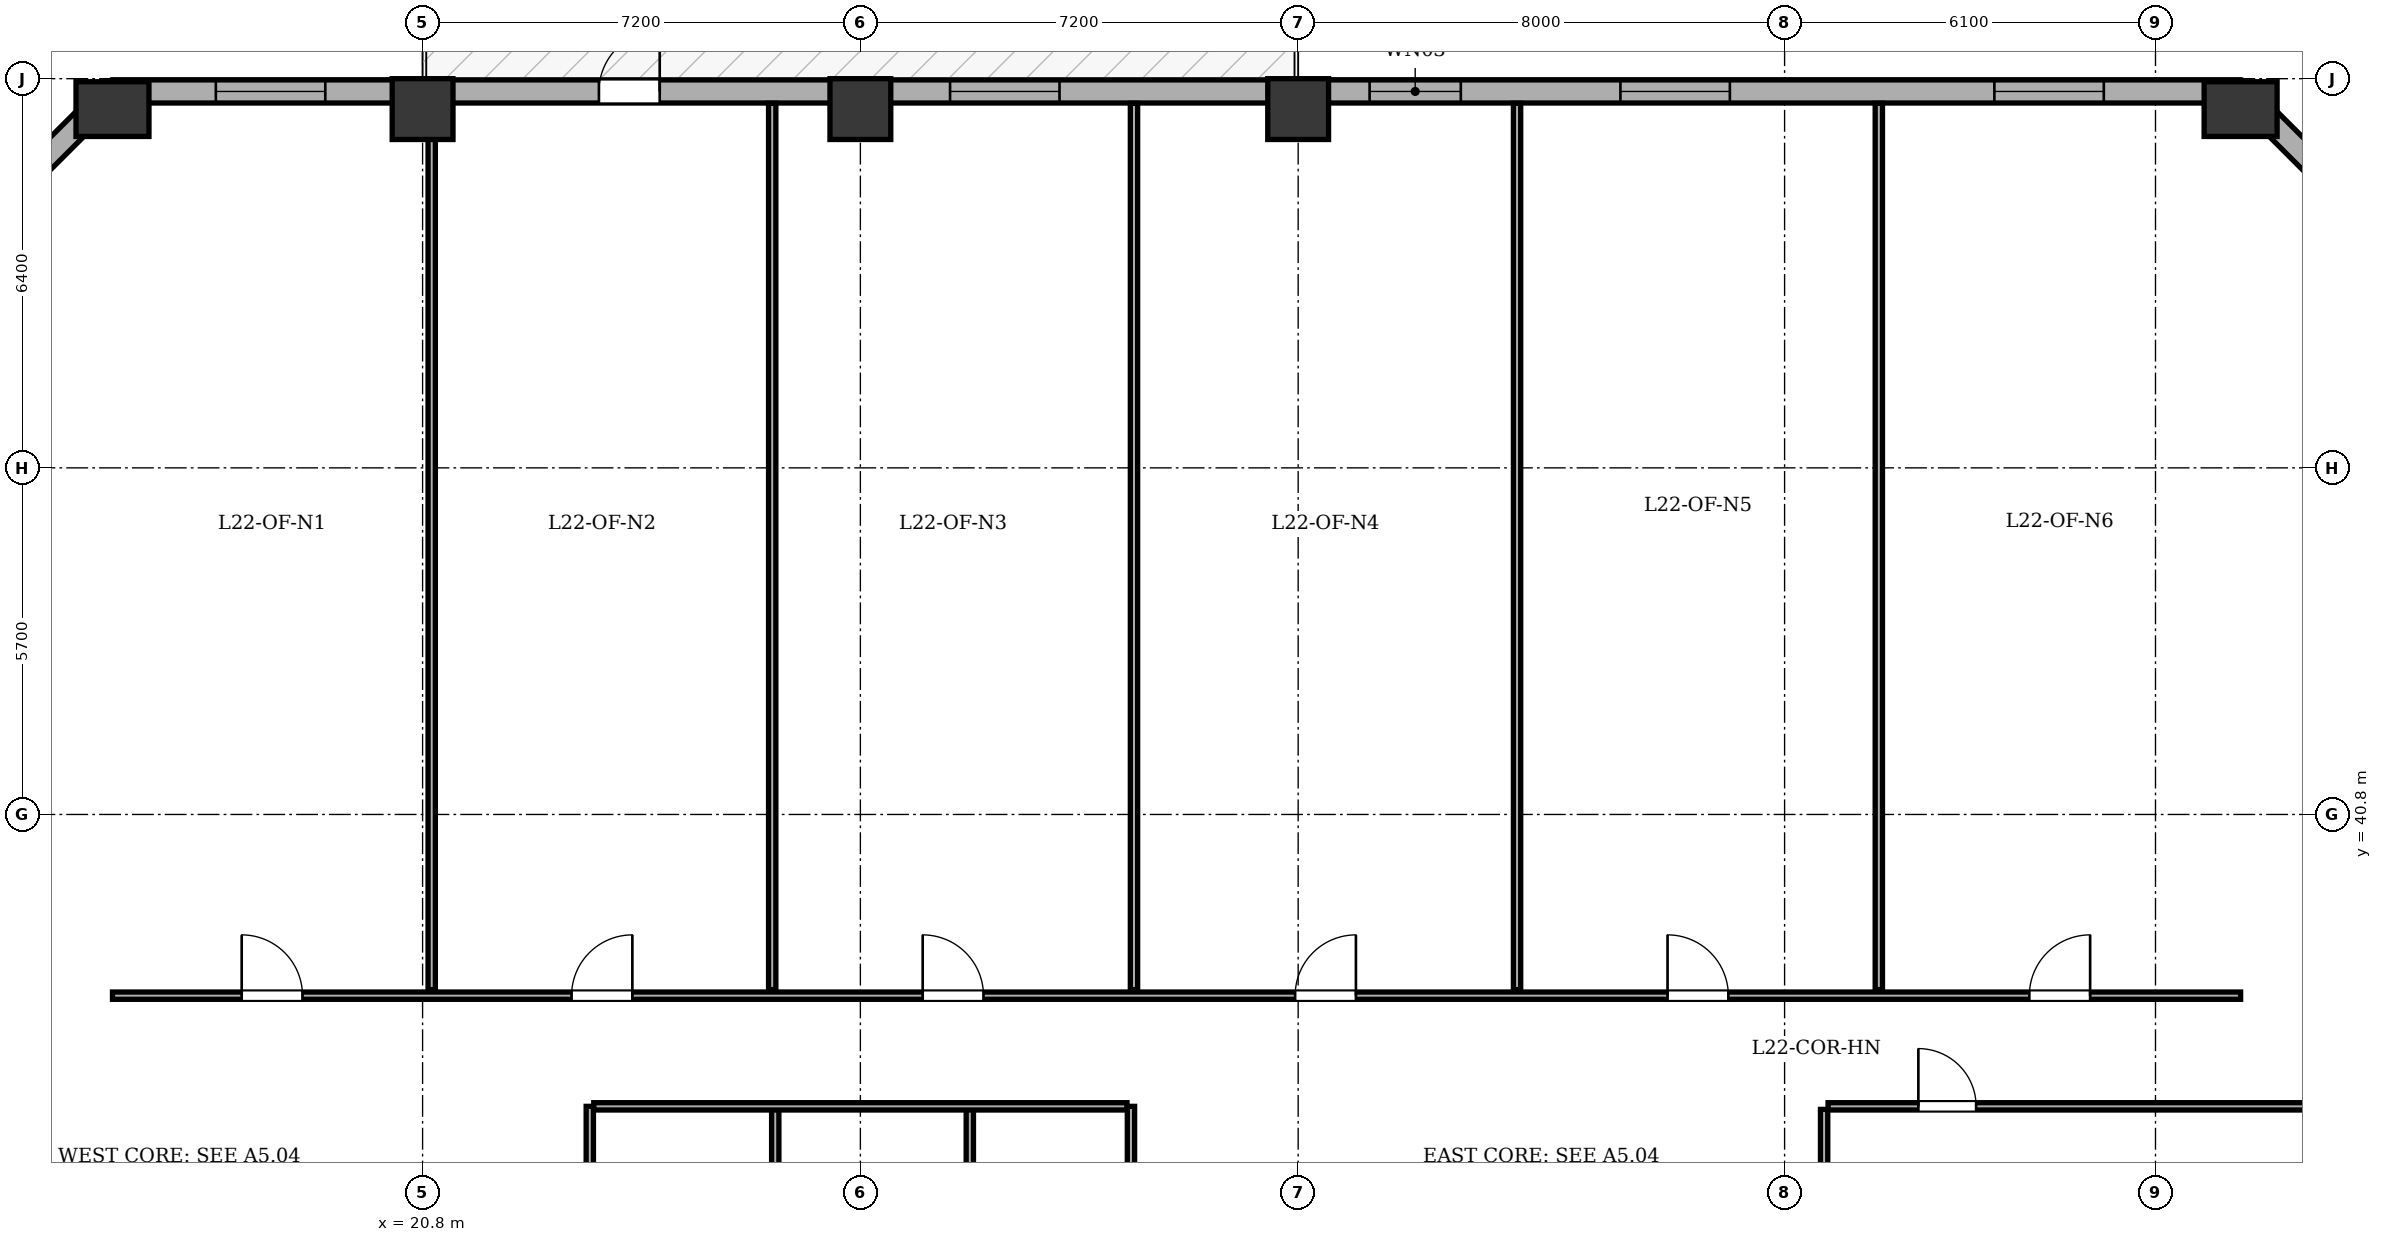
"""IFC4 building model, lengths in metres.
Left out: names, types, materials, properties, quantities, classifications, styles, units other than length and angle.
Written with IfcOpenShell. Run it as: python <this file> out.ifc"""

import sys

from ifc_helpers import new_model, si_unit, direction, frame, frame_2d, origin, origin_2d, place, context, subcontext, project, spatial, rectangle, extrude, element, fill, save


model = new_model("IFC4")
c1 = context("Model", 3, precision=1e-05, world=origin(), true_north=direction((0.0, 1.0)))
c2 = subcontext(c1, "Body", "Model", "MODEL_VIEW")
j1 = project(units=[si_unit("LENGTHUNIT", "METRE"), si_unit("PLANEANGLEUNIT", "RADIAN")], contexts=[c1])
p1 = place(None, origin())
s1 = spatial("IfcSite", under=j1, at=p1, CompositionType="ELEMENT")
p2 = place(p1, origin())
s2 = spatial("IfcBuilding", under=s1, at=p2, CompositionType="ELEMENT")
p3 = place(p2, frame((0.0, 0.0, 90.6)))
s3 = spatial("IfcBuildingStorey", under=s2, at=p3, CompositionType="ELEMENT", Elevation=90.6)
p4 = place(p3, frame((15.7, 52.4, 0.0), z_axis=(0.0, 0.0, 1.0), x_axis=(1.0, 0.0, 0.0)))
e1 = element("IfcColumn", 1, at=p4, inside=s3, PredefinedType="COLUMN", context=c2, shape_type="SweptSolid", body=[
    extrude(rectangle(XDim=0.9, YDim=1.2, at=origin_2d()), origin(), (0.0, 0.0, 1.0), 3.9),
])
for number, where, z_axis, x_axis in (
    (2, (20.8, 52.4, 0.0), (0.0, 0.0, 1.0), (1.0, 0.0, 0.0)),
    (3, (28.0, 52.4, 0.0), (0.0, 0.0, 1.0), (1.0, 0.0, 0.0)),
    (4, (35.2, 52.4, 0.0), (0.0, 0.0, 1.0), (1.0, 0.0, 0.0)),
):
    element("IfcColumn", number, at=place(p3, frame(where, z_axis=z_axis, x_axis=x_axis)), inside=s3, PredefinedType="COLUMN", context=c2, shape_type="SweptSolid", body=[
        extrude(rectangle(XDim=1.0, YDim=1.0, at=origin_2d()), origin(), (0.0, 0.0, 1.0), 3.9),
    ])
p5 = place(p3, frame((50.7, 52.4, 0.0), z_axis=(0.0, 0.0, 1.0), x_axis=(1.0, 0.0, 0.0)))
e5 = element("IfcColumn", 5, at=p5, inside=s3, PredefinedType="COLUMN", context=c2, shape_type="SweptSolid", body=[
    extrude(rectangle(XDim=0.9, YDim=1.2, at=origin_2d()), origin(), (0.0, 0.0, 1.0), 3.9),
])
p6 = place(p3, frame((10.91, 47.9, 0.0), z_axis=(0.0, 0.0, 1.0), x_axis=(0.707106781187, 0.707106781187, 0.0)))
e6 = element("IfcWall", 6, at=p6, inside=s3, PredefinedType="STANDARD", context=c2, shape_type="SweptSolid", body=[
    extrude(rectangle(XDim=6.774, YDim=0.38, at=frame_2d((3.387, 0.0))), origin(), (0.0, 0.0, 1.0), 2.835),
])
p7 = place(p6, frame((2.687, 0.0, 0.8)))
e7 = element("IfcOpeningElement", 7, at=p7, cuts=e6, PredefinedType="OPENING", context=c2, shape_type="SweptSolid", body=[
    extrude(rectangle(XDim=1.4, YDim=1.65, at=frame_2d((0.7, 0.825))), frame((0.0, 0.2, 0.0), z_axis=(0.0, -1.0, 0.0), x_axis=(1.0, 0.0, 0.0)), (0.0, 0.0, 1.0), 0.4),
])
p8 = place(p3, frame((15.7, 52.69, 0.0), z_axis=(0.0, 0.0, 1.0), x_axis=(1.0, 0.0, 0.0)))
e8 = element("IfcWall", 8, at=p8, inside=s3, PredefinedType="STANDARD", context=c2, shape_type="SweptSolid", body=[
    extrude(rectangle(XDim=35.0, YDim=0.38, at=frame_2d((17.5, 0.0))), origin(), (0.0, 0.0, 1.0), 2.835),
])
p9 = place(p8, frame((8.0, 0.0, 0.0)))
e9 = element("IfcOpeningElement", 9, at=p9, cuts=e8, PredefinedType="OPENING", context=c2, shape_type="SweptSolid", body=[
    extrude(rectangle(XDim=1.0, YDim=2.02, at=frame_2d((0.5, 1.01))), frame((0.0, 0.2, 0.0), z_axis=(0.0, -1.0, 0.0), x_axis=(1.0, 0.0, 0.0)), (0.0, 0.0, 1.0), 0.4),
])
p10 = place(p8, frame((1.7, 0.0, 0.8)))
e10 = element("IfcOpeningElement", 10, at=p10, cuts=e8, PredefinedType="OPENING", context=c2, shape_type="SweptSolid", body=[
    extrude(rectangle(XDim=1.8, YDim=1.9, at=frame_2d((0.9, 0.95))), frame((0.0, 0.2, 0.0), z_axis=(0.0, -1.0, 0.0), x_axis=(1.0, 0.0, 0.0)), (0.0, 0.0, 1.0), 0.4),
])
p11 = place(p8, frame((13.775, 0.0, 0.8)))
e11 = element("IfcOpeningElement", 11, at=p11, cuts=e8, PredefinedType="OPENING", context=c2, shape_type="SweptSolid", body=[
    extrude(rectangle(XDim=1.8, YDim=1.9, at=frame_2d((0.9, 0.95))), frame((0.0, 0.2, 0.0), z_axis=(0.0, -1.0, 0.0), x_axis=(1.0, 0.0, 0.0)), (0.0, 0.0, 1.0), 0.4),
])
p12 = place(p8, frame((20.675, 0.0, 0.8)))
e12 = element("IfcOpeningElement", 12, at=p12, cuts=e8, PredefinedType="OPENING", context=c2, shape_type="SweptSolid", body=[
    extrude(rectangle(XDim=1.5, YDim=1.9, at=frame_2d((0.75, 0.95))), frame((0.0, 0.2, 0.0), z_axis=(0.0, -1.0, 0.0), x_axis=(1.0, 0.0, 0.0)), (0.0, 0.0, 1.0), 0.4),
])
p13 = place(p8, frame((24.8, 0.0, 0.8)))
e13 = element("IfcOpeningElement", 13, at=p13, cuts=e8, PredefinedType="OPENING", context=c2, shape_type="SweptSolid", body=[
    extrude(rectangle(XDim=1.8, YDim=1.9, at=frame_2d((0.9, 0.95))), frame((0.0, 0.2, 0.0), z_axis=(0.0, -1.0, 0.0), x_axis=(1.0, 0.0, 0.0)), (0.0, 0.0, 1.0), 0.4),
])
p14 = place(p8, frame((30.95, 0.0, 0.8)))
e14 = element("IfcOpeningElement", 14, at=p14, cuts=e8, PredefinedType="OPENING", context=c2, shape_type="SweptSolid", body=[
    extrude(rectangle(XDim=1.8, YDim=1.9, at=frame_2d((0.9, 0.95))), frame((0.0, 0.2, 0.0), z_axis=(0.0, -1.0, 0.0), x_axis=(1.0, 0.0, 0.0)), (0.0, 0.0, 1.0), 0.4),
])
p15 = place(p3, frame((50.7, 52.69, 0.0), z_axis=(0.0, 0.0, 1.0), x_axis=(0.707106781187, -0.707106781187, 0.0)))
e15 = element("IfcWall", 15, at=p15, inside=s3, PredefinedType="STANDARD", context=c2, shape_type="SweptSolid", body=[
    extrude(rectangle(XDim=6.774, YDim=0.38, at=frame_2d((3.387, 0.0))), origin(), (0.0, 0.0, 1.0), 2.835),
])
p16 = place(p15, frame((2.687, 0.0, 0.8)))
e16 = element("IfcOpeningElement", 16, at=p16, cuts=e15, PredefinedType="OPENING", context=c2, shape_type="SweptSolid", body=[
    extrude(rectangle(XDim=1.4, YDim=1.65, at=frame_2d((0.7, 0.825))), frame((0.0, 0.2, 0.0), z_axis=(0.0, -1.0, 0.0), x_axis=(1.0, 0.0, 0.0)), (0.0, 0.0, 1.0), 0.4),
])
for number, where, z_axis, x_axis in (
    (17, (23.55, 24.715, 0.0), (0.0, 0.0, 1.0), (0.0, 1.0, 0.0)),
    (18, (32.45, 24.715, 0.0), (0.0, 0.0, 1.0), (0.0, 1.0, 0.0)),
    (19, (26.6, 24.715, 0.0), (0.0, 0.0, 1.0), (0.0, 1.0, 0.0)),
):
    element("IfcWall", number, at=place(p3, frame(where, z_axis=z_axis, x_axis=x_axis)), inside=s3, PredefinedType="PARTITIONING", context=c2, shape_type="SweptSolid", body=[
        extrude(rectangle(XDim=11.285, YDim=0.12, at=frame_2d((5.643, 0.0))), origin(), (0.0, 0.0, 1.0), 3.45),
    ])
p17 = place(p3, frame((29.8, 24.715, 0.0), z_axis=(0.0, 0.0, 1.0), x_axis=(0.0, 1.0, 0.0)))
e20 = element("IfcWall", 20, at=p17, inside=s3, PredefinedType="PARTITIONING", context=c2, shape_type="SweptSolid", body=[
    extrude(rectangle(XDim=11.285, YDim=0.12, at=frame_2d((5.643, 0.0))), origin(), (0.0, 0.0, 1.0), 2.885),
])
p18 = place(p3, frame((23.615, 36.0, 0.0), z_axis=(0.0, 0.0, 1.0), x_axis=(1.0, 0.0, 0.0)))
e21 = element("IfcWall", 21, at=p18, inside=s3, PredefinedType="PARTITIONING", context=c2, shape_type="SweptSolid", body=[
    extrude(rectangle(XDim=8.77, YDim=0.12, at=frame_2d((4.385, 0.0))), origin(), (0.0, 0.0, 1.0), 3.45),
])
p19 = place(p3, frame((15.7, 37.82, 0.0), z_axis=(0.0, 0.0, 1.0), x_axis=(1.0, 0.0, 0.0)))
e22 = element("IfcWall", 22, at=p19, inside=s3, PredefinedType="PARTITIONING", context=c2, shape_type="SweptSolid", body=[
    extrude(rectangle(XDim=35.0, YDim=0.12, at=frame_2d((17.5, 0.0))), origin(), (0.0, 0.0, 1.0), 3.45),
])
p20 = place(p19, frame((2.125, 0.0, 0.0)))
e23 = element("IfcOpeningElement", 23, at=p20, cuts=e22, PredefinedType="OPENING", context=c2, shape_type="SweptSolid", body=[
    extrude(rectangle(XDim=1.0, YDim=2.1, at=frame_2d((0.5, 1.05))), frame((0.0, 0.07, 0.0), z_axis=(0.0, -1.0, 0.0), x_axis=(1.0, 0.0, 0.0)), (0.0, 0.0, 1.0), 0.14),
])
p21 = place(p19, frame((7.55, 0.0, 0.0)))
e24 = element("IfcOpeningElement", 24, at=p21, cuts=e22, PredefinedType="OPENING", context=c2, shape_type="SweptSolid", body=[
    extrude(rectangle(XDim=1.0, YDim=2.1, at=frame_2d((0.5, 1.05))), frame((0.0, 0.07, 0.0), z_axis=(0.0, -1.0, 0.0), x_axis=(1.0, 0.0, 0.0)), (0.0, 0.0, 1.0), 0.14),
])
p22 = place(p19, frame((13.325, 0.0, 0.0)))
e25 = element("IfcOpeningElement", 25, at=p22, cuts=e22, PredefinedType="OPENING", context=c2, shape_type="SweptSolid", body=[
    extrude(rectangle(XDim=1.0, YDim=2.1, at=frame_2d((0.5, 1.05))), frame((0.0, 0.07, 0.0), z_axis=(0.0, -1.0, 0.0), x_axis=(1.0, 0.0, 0.0)), (0.0, 0.0, 1.0), 0.14),
])
p23 = place(p19, frame((19.45, 0.0, 0.0)))
e26 = element("IfcOpeningElement", 26, at=p23, cuts=e22, PredefinedType="OPENING", context=c2, shape_type="SweptSolid", body=[
    extrude(rectangle(XDim=1.0, YDim=2.1, at=frame_2d((0.5, 1.05))), frame((0.0, 0.07, 0.0), z_axis=(0.0, -1.0, 0.0), x_axis=(1.0, 0.0, 0.0)), (0.0, 0.0, 1.0), 0.14),
])
p24 = place(p19, frame((25.575, 0.0, 0.0)))
e27 = element("IfcOpeningElement", 27, at=p24, cuts=e22, PredefinedType="OPENING", context=c2, shape_type="SweptSolid", body=[
    extrude(rectangle(XDim=1.0, YDim=2.1, at=frame_2d((0.5, 1.05))), frame((0.0, 0.07, 0.0), z_axis=(0.0, -1.0, 0.0), x_axis=(1.0, 0.0, 0.0)), (0.0, 0.0, 1.0), 0.14),
])
p25 = place(p19, frame((31.525, 0.0, 0.0)))
e28 = element("IfcOpeningElement", 28, at=p25, cuts=e22, PredefinedType="OPENING", context=c2, shape_type="SweptSolid", body=[
    extrude(rectangle(XDim=1.0, YDim=2.1, at=frame_2d((0.5, 1.05))), frame((0.0, 0.07, 0.0), z_axis=(0.0, -1.0, 0.0), x_axis=(1.0, 0.0, 0.0)), (0.0, 0.0, 1.0), 0.14),
])
p26 = place(p3, frame((20.95, 37.92, 0.0), z_axis=(0.0, 0.0, 1.0), x_axis=(0.0, 1.0, 0.0)))
e29 = element("IfcWall", 29, at=p26, inside=s3, PredefinedType="PARTITIONING", context=c2, shape_type="SweptSolid", body=[
    extrude(rectangle(XDim=14.575, YDim=0.12, at=frame_2d((7.288, 0.0))), origin(), (0.0, 0.0, 1.0), 2.535),
])
for number, where, z_axis, x_axis in (
    (30, (26.55, 37.92, 0.0), (0.0, 0.0, 1.0), (0.0, 1.0, 0.0)),
    (31, (32.5, 37.92, 0.0), (0.0, 0.0, 1.0), (0.0, 1.0, 0.0)),
    (32, (38.8, 37.92, 0.0), (0.0, 0.0, 1.0), (0.0, 1.0, 0.0)),
):
    element("IfcWall", number, at=place(p3, frame(where, z_axis=z_axis, x_axis=x_axis)), inside=s3, PredefinedType="PARTITIONING", context=c2, shape_type="SweptSolid", body=[
        extrude(rectangle(XDim=14.575, YDim=0.12, at=frame_2d((7.288, 0.0))), origin(), (0.0, 0.0, 1.0), 3.45),
    ])
p27 = place(p3, frame((44.75, 37.92, 0.0), z_axis=(0.0, 0.0, 1.0), x_axis=(0.0, 1.0, 0.0)))
e33 = element("IfcWall", 33, at=p27, inside=s3, PredefinedType="PARTITIONING", context=c2, shape_type="SweptSolid", body=[
    extrude(rectangle(XDim=14.575, YDim=0.12, at=frame_2d((7.288, 0.0))), origin(), (0.0, 0.0, 1.0), 2.035),
])
p28 = place(p3, frame((43.85, 18.45, 0.0), z_axis=(0.0, 0.0, 1.0), x_axis=(0.0, 1.0, 0.0)))
e34 = element("IfcWall", 34, at=p28, inside=s3, PredefinedType="PARTITIONING", context=c2, shape_type="SweptSolid", body=[
    extrude(rectangle(XDim=17.5, YDim=0.12, at=frame_2d((8.75, 0.0))), origin(), (0.0, 0.0, 1.0), 2.035),
])
p29 = place(p3, frame((43.915, 36.0, 0.0), z_axis=(0.0, 0.0, 1.0), x_axis=(1.0, 0.0, 0.0)))
e35 = element("IfcWall", 35, at=p29, inside=s3, PredefinedType="PARTITIONING", context=c2, shape_type="SweptSolid", body=[
    extrude(rectangle(XDim=11.38, YDim=0.12, at=frame_2d((5.69, 0.0))), origin(), (0.0, 0.0, 1.0), 3.45),
])
p30 = place(p29, frame((1.485, 0.0, 0.0)))
e36 = element("IfcOpeningElement", 36, at=p30, cuts=e35, PredefinedType="OPENING", context=c2, shape_type="SweptSolid", body=[
    extrude(rectangle(XDim=0.95, YDim=2.1, at=frame_2d((0.475, 1.05))), frame((0.0, 0.07, 0.0), z_axis=(0.0, -1.0, 0.0), x_axis=(1.0, 0.0, 0.0)), (0.0, 0.0, 1.0), 0.14),
])
p31 = place(p9, origin())
e37 = element("IfcDoor", 37, at=p31, inside=s3, OperationType="SINGLE_SWING_RIGHT", PredefinedType="DOOR", context=c2, shape_type="SweptSolid", body=[
    extrude(rectangle(XDim=1.0, YDim=2.02, at=frame_2d((0.5, 1.01))), frame((0.0, 0.025, 0.0), z_axis=(0.0, -1.0, 0.0), x_axis=(1.0, 0.0, 0.0)), (0.0, 0.0, 1.0), 0.05),
])
fill(e9, e37)
p32 = place(p10, origin())
e38 = element("IfcWindow", 38, at=p32, inside=s3, PartitioningType="SINGLE_PANEL", PredefinedType="WINDOW", context=c2, shape_type="SweptSolid", body=[
    extrude(rectangle(XDim=1.8, YDim=1.9, at=frame_2d((0.9, 0.95))), frame((0.0, -0.01, 0.0), z_axis=(0.0, -1.0, 0.0), x_axis=(1.0, 0.0, 0.0)), (0.0, 0.0, 1.0), 0.06),
])
fill(e10, e38)
p33 = place(p11, origin())
e39 = element("IfcWindow", 39, at=p33, inside=s3, PartitioningType="SINGLE_PANEL", PredefinedType="WINDOW", context=c2, shape_type="SweptSolid", body=[
    extrude(rectangle(XDim=1.8, YDim=1.9, at=frame_2d((0.9, 0.95))), frame((0.0, -0.01, 0.0), z_axis=(0.0, -1.0, 0.0), x_axis=(1.0, 0.0, 0.0)), (0.0, 0.0, 1.0), 0.06),
])
fill(e11, e39)
p34 = place(p12, origin())
e40 = element("IfcWindow", 40, at=p34, inside=s3, PartitioningType="SINGLE_PANEL", PredefinedType="WINDOW", context=c2, shape_type="SweptSolid", body=[
    extrude(rectangle(XDim=1.5, YDim=1.9, at=frame_2d((0.75, 0.95))), frame((0.0, -0.01, 0.0), z_axis=(0.0, -1.0, 0.0), x_axis=(1.0, 0.0, 0.0)), (0.0, 0.0, 1.0), 0.06),
])
fill(e12, e40)
p35 = place(p13, origin())
e41 = element("IfcWindow", 41, at=p35, inside=s3, PartitioningType="SINGLE_PANEL", PredefinedType="WINDOW", context=c2, shape_type="SweptSolid", body=[
    extrude(rectangle(XDim=1.8, YDim=1.9, at=frame_2d((0.9, 0.95))), frame((0.0, -0.01, 0.0), z_axis=(0.0, -1.0, 0.0), x_axis=(1.0, 0.0, 0.0)), (0.0, 0.0, 1.0), 0.06),
])
fill(e13, e41)
p36 = place(p14, origin())
e42 = element("IfcWindow", 42, at=p36, inside=s3, PartitioningType="SINGLE_PANEL", PredefinedType="WINDOW", context=c2, shape_type="SweptSolid", body=[
    extrude(rectangle(XDim=1.8, YDim=1.9, at=frame_2d((0.9, 0.95))), frame((0.0, -0.01, 0.0), z_axis=(0.0, -1.0, 0.0), x_axis=(1.0, 0.0, 0.0)), (0.0, 0.0, 1.0), 0.06),
])
fill(e14, e42)
p37 = place(p20, origin())
e43 = element("IfcDoor", 43, at=p37, inside=s3, OperationType="SINGLE_SWING_LEFT", PredefinedType="DOOR", context=c2, shape_type="SweptSolid", body=[
    extrude(rectangle(XDim=1.0, YDim=2.1, at=frame_2d((0.5, 1.05))), frame((0.0, 0.025, 0.0), z_axis=(0.0, -1.0, 0.0), x_axis=(1.0, 0.0, 0.0)), (0.0, 0.0, 1.0), 0.05),
])
fill(e23, e43)
p38 = place(p21, origin())
e44 = element("IfcDoor", 44, at=p38, inside=s3, OperationType="SINGLE_SWING_RIGHT", PredefinedType="DOOR", context=c2, shape_type="SweptSolid", body=[
    extrude(rectangle(XDim=1.0, YDim=2.1, at=frame_2d((0.5, 1.05))), frame((0.0, 0.025, 0.0), z_axis=(0.0, -1.0, 0.0), x_axis=(1.0, 0.0, 0.0)), (0.0, 0.0, 1.0), 0.05),
])
fill(e24, e44)
p39 = place(p22, origin())
e45 = element("IfcDoor", 45, at=p39, inside=s3, OperationType="SINGLE_SWING_LEFT", PredefinedType="DOOR", context=c2, shape_type="SweptSolid", body=[
    extrude(rectangle(XDim=1.0, YDim=2.1, at=frame_2d((0.5, 1.05))), frame((0.0, 0.025, 0.0), z_axis=(0.0, -1.0, 0.0), x_axis=(1.0, 0.0, 0.0)), (0.0, 0.0, 1.0), 0.05),
])
fill(e25, e45)
p40 = place(p23, origin())
e46 = element("IfcDoor", 46, at=p40, inside=s3, OperationType="SINGLE_SWING_RIGHT", PredefinedType="DOOR", context=c2, shape_type="SweptSolid", body=[
    extrude(rectangle(XDim=1.0, YDim=2.1, at=frame_2d((0.5, 1.05))), frame((0.0, 0.025, 0.0), z_axis=(0.0, -1.0, 0.0), x_axis=(1.0, 0.0, 0.0)), (0.0, 0.0, 1.0), 0.05),
])
fill(e26, e46)
p41 = place(p24, origin())
e47 = element("IfcDoor", 47, at=p41, inside=s3, OperationType="SINGLE_SWING_LEFT", PredefinedType="DOOR", context=c2, shape_type="SweptSolid", body=[
    extrude(rectangle(XDim=1.0, YDim=2.1, at=frame_2d((0.5, 1.05))), frame((0.0, 0.025, 0.0), z_axis=(0.0, -1.0, 0.0), x_axis=(1.0, 0.0, 0.0)), (0.0, 0.0, 1.0), 0.05),
])
fill(e27, e47)
p42 = place(p25, origin())
e48 = element("IfcDoor", 48, at=p42, inside=s3, OperationType="SINGLE_SWING_RIGHT", PredefinedType="DOOR", context=c2, shape_type="SweptSolid", body=[
    extrude(rectangle(XDim=1.0, YDim=2.1, at=frame_2d((0.5, 1.05))), frame((0.0, 0.025, 0.0), z_axis=(0.0, -1.0, 0.0), x_axis=(1.0, 0.0, 0.0)), (0.0, 0.0, 1.0), 0.05),
])
fill(e28, e48)
p43 = place(p30, origin())
e49 = element("IfcDoor", 49, at=p43, inside=s3, OperationType="SINGLE_SWING_LEFT", PredefinedType="DOOR", context=c2, shape_type="SweptSolid", body=[
    extrude(rectangle(XDim=0.95, YDim=2.1, at=frame_2d((0.475, 1.05))), frame((0.0, 0.025, 0.0), z_axis=(0.0, -1.0, 0.0), x_axis=(1.0, 0.0, 0.0)), (0.0, 0.0, 1.0), 0.05),
])
fill(e36, e49)
save(model, sys.argv[1])
